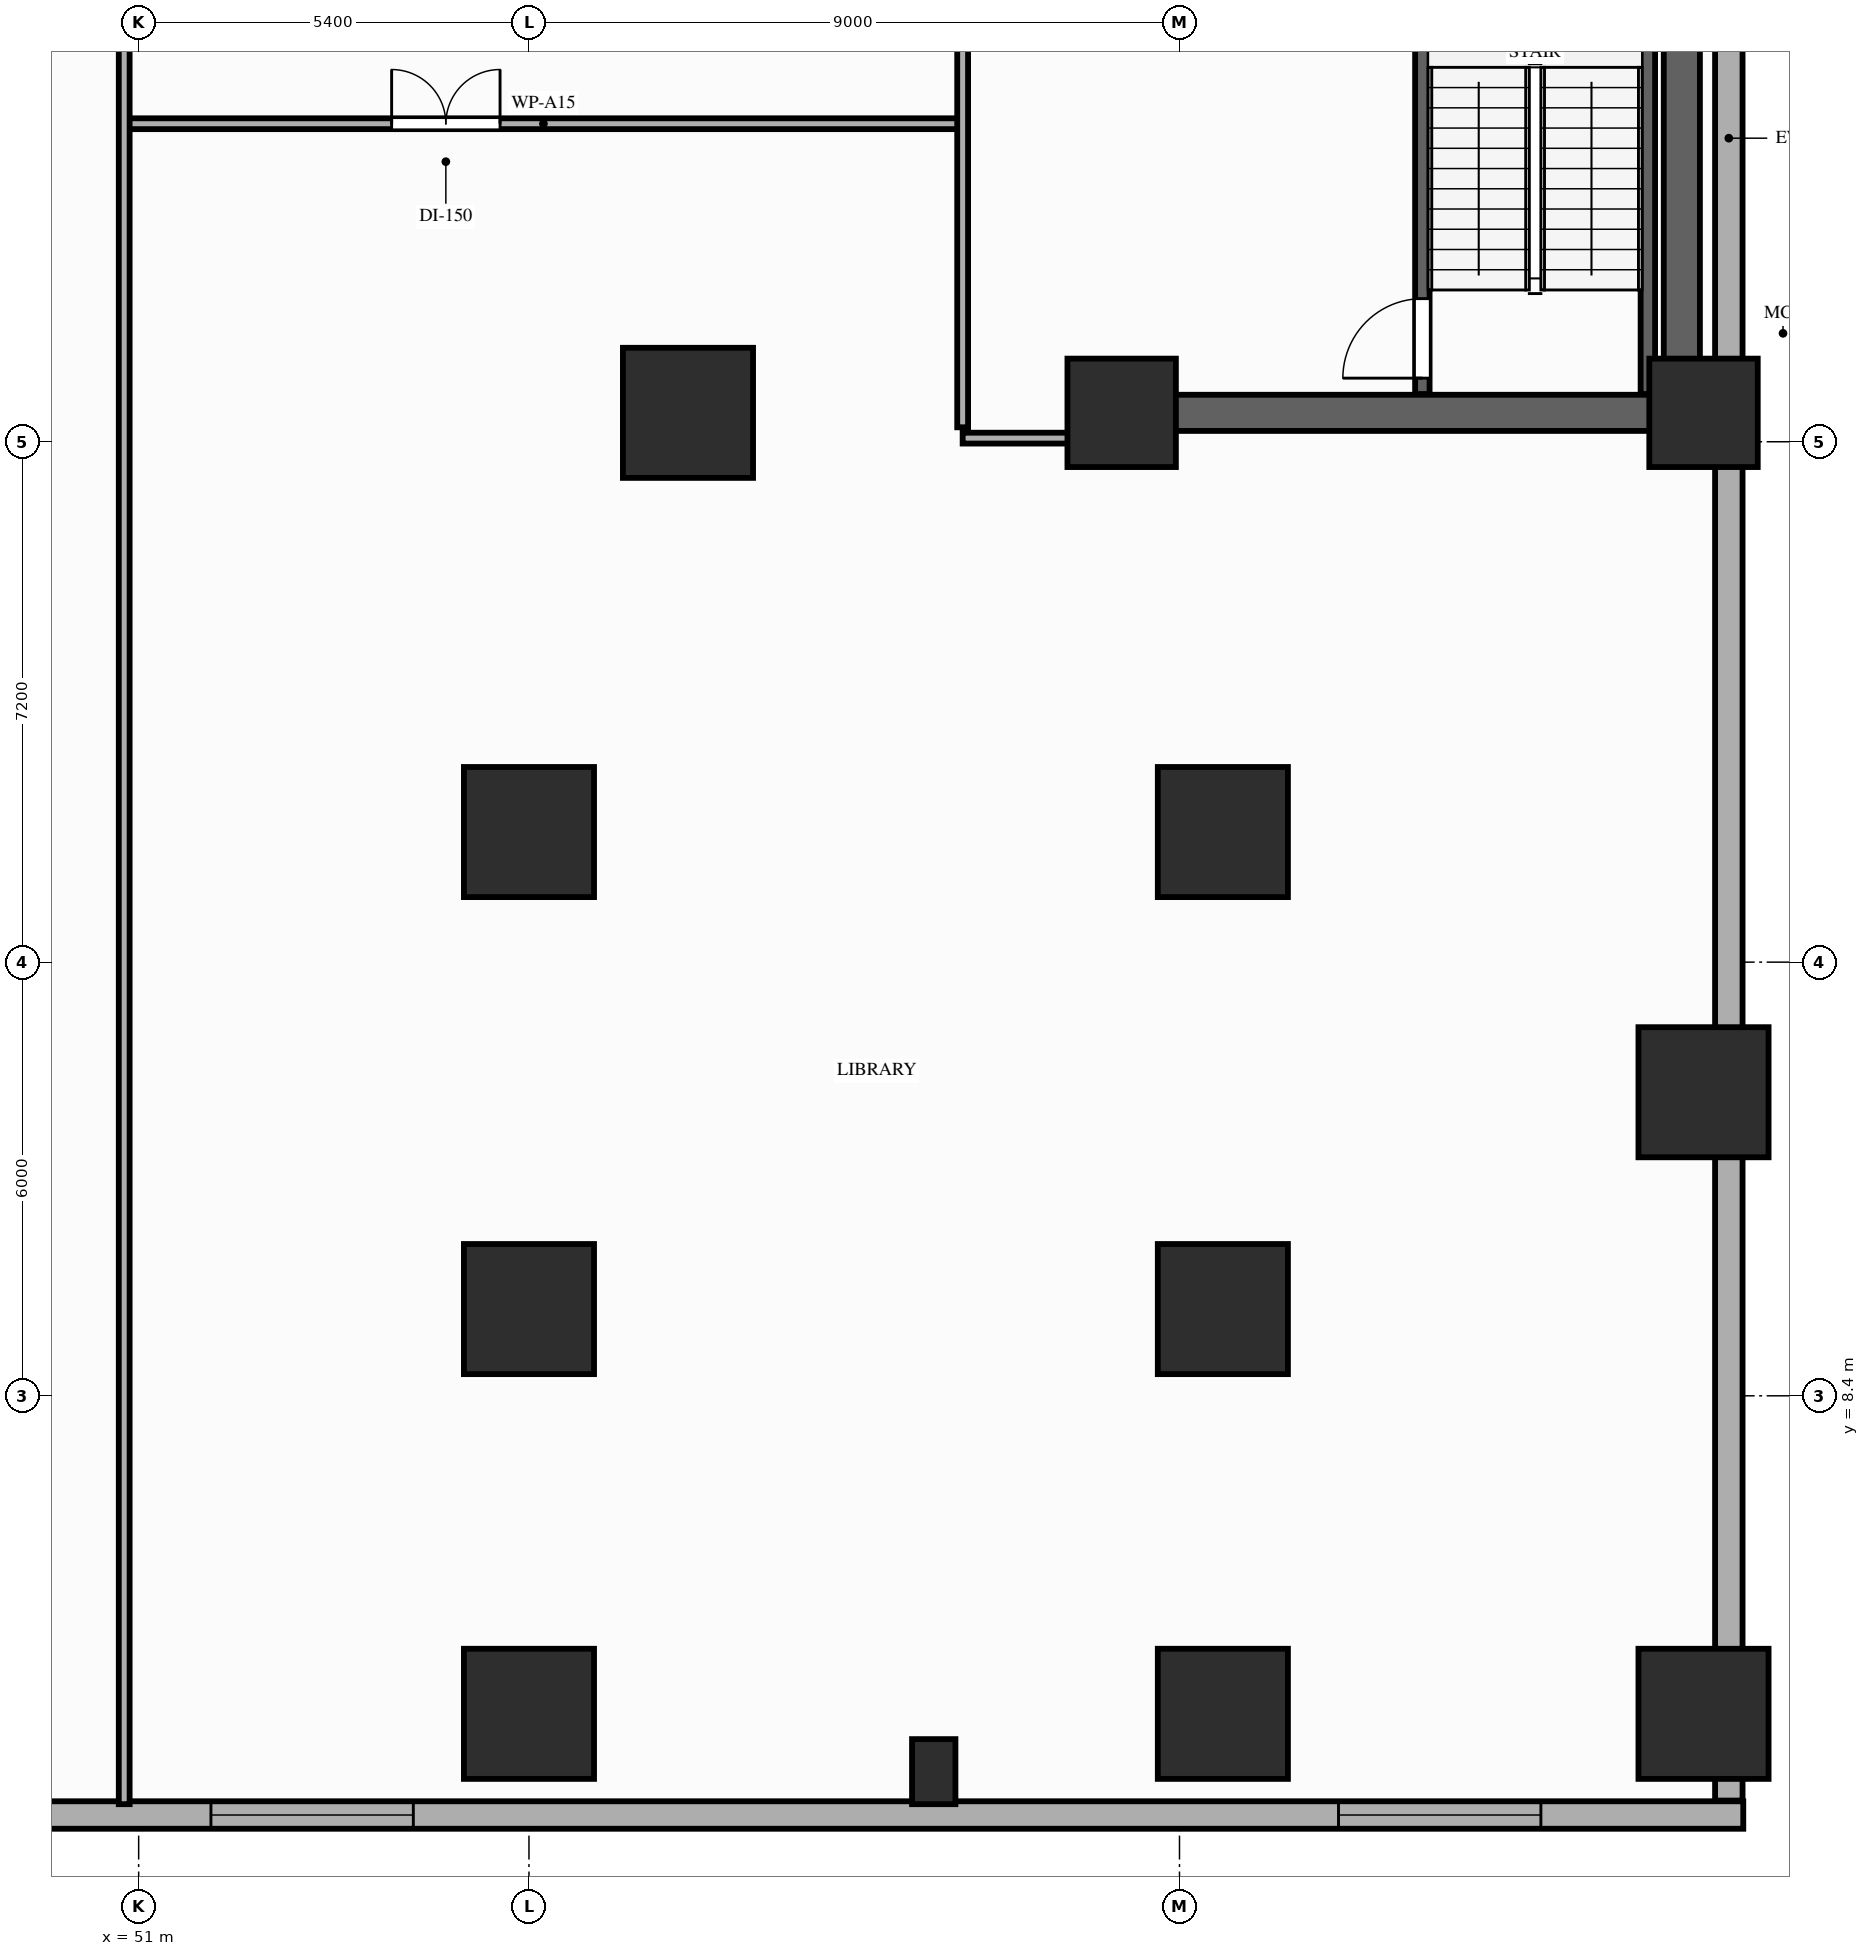
"""IFC4 building model, lengths in metres.
Left out: names, types, materials, properties, quantities, classifications, styles, units other than length and angle.
Written with IfcOpenShell. Run it as: python <this file> out.ifc"""

import sys

from ifc_helpers import new_model, si_unit, direction, frame, frame_2d, origin, origin_2d, place, context, subcontext, project, spatial, rectangle, extrude, element, fill, save


model = new_model("IFC4")
c1 = context("Model", 3, precision=1e-05, world=origin(), true_north=direction((0.0, 1.0)))
c2 = subcontext(c1, "Body", "Model", "MODEL_VIEW")
j1 = project(units=[si_unit("LENGTHUNIT", "METRE"), si_unit("PLANEANGLEUNIT", "RADIAN")], contexts=[c1])
p1 = place(None, origin())
s1 = spatial("IfcSite", under=j1, at=p1, CompositionType="ELEMENT")
p2 = place(p1, origin())
s2 = spatial("IfcBuilding", under=s1, at=p2, CompositionType="ELEMENT")
p3 = place(p2, frame((0.0, 0.0, 4.6)))
s3 = spatial("IfcBuildingStorey", under=s2, at=p3, CompositionType="ELEMENT", Elevation=4.6)
for number, where, z_axis, x_axis in (
    (1, (64.6, 22.0, 0.0), (0.0, 0.0, 1.0), (1.0, 0.0, 0.0)),
    (2, (72.65, 22.0, 0.0), (0.0, 0.0, 1.0), (1.0, 0.0, 0.0)),
):
    element("IfcColumn", number, at=place(p3, frame(where, z_axis=z_axis, x_axis=x_axis)), inside=s3, PredefinedType="COLUMN", context=c2, shape_type="SweptSolid", body=[
        extrude(rectangle(XDim=1.5, YDim=1.5, at=origin_2d()), origin(), (0.0, 0.0, 1.0), 4.2),
    ])
for number, where, z_axis, x_axis in (
    (3, (58.6, 22.0, 0.0), (0.0, 0.0, 1.0), (1.0, 0.0, 0.0)),
    (4, (56.4, 9.6, 0.0), (0.0, 0.0, 1.0), (1.0, 0.0, 0.0)),
    (5, (66.0, 9.6, 0.0), (0.0, 0.0, 1.0), (1.0, 0.0, 0.0)),
    (6, (56.4, 16.2, 0.0), (0.0, 0.0, 1.0), (1.0, 0.0, 0.0)),
    (7, (66.0, 16.2, 0.0), (0.0, 0.0, 1.0), (1.0, 0.0, 0.0)),
    (8, (56.4, 4.0, 0.0), (0.0, 0.0, 1.0), (1.0, 0.0, 0.0)),
    (9, (66.0, 4.0, 0.0), (0.0, 0.0, 1.0), (1.0, 0.0, 0.0)),
    (10, (72.65, 4.0, 0.0), (0.0, 0.0, 1.0), (1.0, 0.0, 0.0)),
    (11, (72.65, 12.6, 0.0), (0.0, 0.0, 1.0), (1.0, 0.0, 0.0)),
):
    element("IfcColumn", number, at=place(p3, frame(where, z_axis=z_axis, x_axis=x_axis)), inside=s3, PredefinedType="COLUMN", context=c2, shape_type="SweptSolid", body=[
        extrude(rectangle(XDim=1.8, YDim=1.8, at=origin_2d()), origin(), (0.0, 0.0, 1.0), 4.2),
    ])
p4 = place(p3, frame((62.0, 3.2, 0.0), z_axis=(0.0, 0.0, 1.0), x_axis=(1.0, 0.0, 0.0)))
e12 = element("IfcColumn", 12, at=p4, inside=s3, PredefinedType="PILASTER", context=c2, shape_type="SweptSolid", body=[
    extrude(rectangle(XDim=0.6, YDim=0.9, at=origin_2d()), origin(), (0.0, 0.0, 1.0), 4.2),
])
p5 = place(p3, frame((3.6, 2.6, 0.0), z_axis=(0.0, 0.0, 1.0), x_axis=(1.0, 0.0, 0.0)))
e13 = element("IfcWall", 13, at=p5, inside=s3, PredefinedType="STANDARD", context=c2, shape_type="SweptSolid", body=[
    extrude(rectangle(XDim=69.6, YDim=0.38, at=frame_2d((34.8, 0.0))), origin(), (0.0, 0.0, 1.0), 3.95),
])
p6 = place(p5, frame((17.2, 0.0, 0.9)))
e14 = element("IfcOpeningElement", 14, at=p6, cuts=e13, PredefinedType="OPENING", context=c2, shape_type="SweptSolid", body=[
    extrude(rectangle(XDim=2.8, YDim=2.2, at=frame_2d((1.4, 1.1))), frame((0.0, 0.2, 0.0), z_axis=(0.0, -1.0, 0.0), x_axis=(1.0, 0.0, 0.0)), (0.0, 0.0, 1.0), 0.4),
])
p7 = place(p5, frame((24.6, 0.0, 0.9)))
e15 = element("IfcOpeningElement", 15, at=p7, cuts=e13, PredefinedType="OPENING", context=c2, shape_type="SweptSolid", body=[
    extrude(rectangle(XDim=2.8, YDim=2.2, at=frame_2d((1.4, 1.1))), frame((0.0, 0.2, 0.0), z_axis=(0.0, -1.0, 0.0), x_axis=(1.0, 0.0, 0.0)), (0.0, 0.0, 1.0), 0.4),
])
p8 = place(p5, frame((36.2, 0.0, 0.9)))
e16 = element("IfcOpeningElement", 16, at=p8, cuts=e13, PredefinedType="OPENING", context=c2, shape_type="SweptSolid", body=[
    extrude(rectangle(XDim=2.8, YDim=2.2, at=frame_2d((1.4, 1.1))), frame((0.0, 0.2, 0.0), z_axis=(0.0, -1.0, 0.0), x_axis=(1.0, 0.0, 0.0)), (0.0, 0.0, 1.0), 0.4),
])
p9 = place(p5, frame((48.4, 0.0, 0.9)))
e17 = element("IfcOpeningElement", 17, at=p9, cuts=e13, PredefinedType="OPENING", context=c2, shape_type="SweptSolid", body=[
    extrude(rectangle(XDim=2.8, YDim=2.2, at=frame_2d((1.4, 1.1))), frame((0.0, 0.2, 0.0), z_axis=(0.0, -1.0, 0.0), x_axis=(1.0, 0.0, 0.0)), (0.0, 0.0, 1.0), 0.4),
])
p10 = place(p5, frame((64.0, 0.0, 0.9)))
e18 = element("IfcOpeningElement", 18, at=p10, cuts=e13, PredefinedType="OPENING", context=c2, shape_type="SweptSolid", body=[
    extrude(rectangle(XDim=2.8, YDim=2.2, at=frame_2d((1.4, 1.1))), frame((0.0, 0.2, 0.0), z_axis=(0.0, -1.0, 0.0), x_axis=(1.0, 0.0, 0.0)), (0.0, 0.0, 1.0), 0.4),
])
p11 = place(p3, frame((73.0, 2.8, 0.0), z_axis=(0.0, 0.0, 1.0), x_axis=(0.0, 1.0, 0.0)))
e19 = element("IfcWall", 19, at=p11, inside=s3, PredefinedType="STANDARD", context=c2, shape_type="SweptSolid", body=[
    extrude(rectangle(XDim=46.0, YDim=0.38, at=frame_2d((23.0, 0.0))), origin(), (0.0, 0.0, 1.0), 3.23),
])
p12 = place(p3, frame((72.35, 22.0, 0.0), z_axis=(0.0, 0.0, 1.0), x_axis=(0.0, 1.0, 0.0)))
e20 = element("IfcWall", 20, at=p12, inside=s3, PredefinedType="SHEAR", context=c2, shape_type="SweptSolid", body=[
    extrude(rectangle(XDim=20.25, YDim=0.5, at=frame_2d((10.125, 0.0))), origin(), (0.0, 0.0, 1.0), 3.95),
])
p13 = place(p3, frame((64.6, 22.0, 0.0), z_axis=(0.0, 0.0, 1.0), x_axis=(1.0, 0.0, 0.0)))
e21 = element("IfcWall", 21, at=p13, inside=s3, PredefinedType="SHEAR", context=c2, shape_type="SweptSolid", body=[
    extrude(rectangle(XDim=7.5, YDim=0.5, at=frame_2d((3.75, 0.0))), origin(), (0.0, 0.0, 1.0), 3.95),
])
p14 = place(p3, frame((68.76, 22.26, 0.0), z_axis=(0.0, 0.0, 1.0), x_axis=(0.0, 1.0, 0.0)))
e22 = element("IfcWall", 22, at=p14, inside=s3, PredefinedType="SHEAR", context=c2, shape_type="SweptSolid", body=[
    extrude(rectangle(XDim=7.82, YDim=0.2, at=frame_2d((3.91, 0.0))), origin(), (0.0, 0.0, 1.0), 3.95),
])
p15 = place(p14, frame((0.22, 0.0, 0.0)))
e23 = element("IfcOpeningElement", 23, at=p15, cuts=e22, PredefinedType="OPENING", context=c2, shape_type="SweptSolid", body=[
    extrude(rectangle(XDim=1.1, YDim=2.15, at=frame_2d((0.55, 1.075))), frame((0.0, 0.11, 0.0), z_axis=(0.0, -1.0, 0.0), x_axis=(1.0, 0.0, 0.0)), (0.0, 0.0, 1.0), 0.22),
])
p16 = place(p3, frame((71.88, 22.26, 0.0), z_axis=(0.0, 0.0, 1.0), x_axis=(0.0, 1.0, 0.0)))
e24 = element("IfcWall", 24, at=p16, inside=s3, PredefinedType="SHEAR", context=c2, shape_type="SweptSolid", body=[
    extrude(rectangle(XDim=7.82, YDim=0.2, at=frame_2d((3.91, 0.0))), origin(), (0.0, 0.0, 1.0), 3.95),
])
p17 = place(p3, frame((50.8, 26.0, 0.0), z_axis=(0.0, 0.0, 1.0), x_axis=(1.0, 0.0, 0.0)))
e25 = element("IfcWall", 25, at=p17, inside=s3, PredefinedType="PARTITIONING", context=c2, shape_type="SweptSolid", body=[
    extrude(rectangle(XDim=11.6, YDim=0.15, at=frame_2d((5.8, 0.0))), origin(), (0.0, 0.0, 1.0), 3.23),
])
p18 = place(p17, frame((3.7, 0.0, 0.0)))
e26 = element("IfcOpeningElement", 26, at=p18, cuts=e25, PredefinedType="OPENING", context=c2, shape_type="SweptSolid", body=[
    extrude(rectangle(XDim=1.5, YDim=2.18, at=frame_2d((0.75, 1.09))), frame((0.0, 0.085, 0.0), z_axis=(0.0, -1.0, 0.0), x_axis=(1.0, 0.0, 0.0)), (0.0, 0.0, 1.0), 0.17),
])
p19 = place(p3, frame((50.8, 2.75, 0.0), z_axis=(0.0, 0.0, 1.0), x_axis=(0.0, 1.0, 0.0)))
e27 = element("IfcWall", 27, at=p19, inside=s3, PredefinedType="PARTITIONING", context=c2, shape_type="SweptSolid", body=[
    extrude(rectangle(XDim=24.85, YDim=0.15, at=frame_2d((12.425, 0.0))), origin(), (0.0, 0.0, 1.0), 3.03),
])
p20 = place(p3, frame((62.4, 21.8, 0.0), z_axis=(0.0, 0.0, 1.0), x_axis=(0.0, 1.0, 0.0)))
e28 = element("IfcWall", 28, at=p20, inside=s3, PredefinedType="PARTITIONING", context=c2, shape_type="SweptSolid", body=[
    extrude(rectangle(XDim=27.05, YDim=0.15, at=frame_2d((13.525, 0.0))), origin(), (0.0, 0.0, 1.0), 3.23),
])
p21 = place(p20, frame((6.2, 0.0, 0.0)))
e29 = element("IfcOpeningElement", 29, at=p21, cuts=e28, PredefinedType="OPENING", context=c2, shape_type="SweptSolid", body=[
    extrude(rectangle(XDim=1.1, YDim=2.15, at=frame_2d((0.55, 1.075))), frame((0.0, 0.085, 0.0), z_axis=(0.0, -1.0, 0.0), x_axis=(1.0, 0.0, 0.0)), (0.0, 0.0, 1.0), 0.17),
])
p22 = place(p3, frame((62.4, 21.65, 0.0), z_axis=(0.0, 0.0, 1.0), x_axis=(1.0, 0.0, 0.0)))
e30 = element("IfcWall", 30, at=p22, inside=s3, PredefinedType="PARTITIONING", context=c2, shape_type="SweptSolid", body=[
    extrude(rectangle(XDim=2.05, YDim=0.15, at=frame_2d((1.025, 0.0))), origin(), (0.0, 0.0, 1.0), 3.23),
])
p23 = place(p9, origin())
e31 = element("IfcWindow", 31, at=p23, inside=s3, PartitioningType="SINGLE_PANEL", PredefinedType="WINDOW", context=c2, shape_type="SweptSolid", body=[
    extrude(rectangle(XDim=2.8, YDim=2.2, at=frame_2d((1.4, 1.1))), frame((0.0, 0.03, 0.0), z_axis=(0.0, -1.0, 0.0), x_axis=(1.0, 0.0, 0.0)), (0.0, 0.0, 1.0), 0.06),
])
fill(e17, e31)
p24 = place(p10, origin())
e32 = element("IfcWindow", 32, at=p24, inside=s3, PartitioningType="SINGLE_PANEL", PredefinedType="WINDOW", context=c2, shape_type="SweptSolid", body=[
    extrude(rectangle(XDim=2.8, YDim=2.2, at=frame_2d((1.4, 1.1))), frame((0.0, 0.03, 0.0), z_axis=(0.0, -1.0, 0.0), x_axis=(1.0, 0.0, 0.0)), (0.0, 0.0, 1.0), 0.06),
])
fill(e18, e32)
p25 = place(p15, origin())
e33 = element("IfcDoor", 33, at=p25, inside=s3, OperationType="SINGLE_SWING_LEFT", PredefinedType="DOOR", context=c2, shape_type="SweptSolid", body=[
    extrude(rectangle(XDim=1.1, YDim=2.15, at=frame_2d((0.55, 1.075))), frame((0.0, 0.025, 0.0), z_axis=(0.0, -1.0, 0.0), x_axis=(1.0, 0.0, 0.0)), (0.0, 0.0, 1.0), 0.05),
])
fill(e23, e33)
p26 = place(p18, origin())
e34 = element("IfcDoor", 34, at=p26, inside=s3, OperationType="DOUBLE_DOOR_SINGLE_SWING", PredefinedType="DOOR", context=c2, shape_type="SweptSolid", body=[
    extrude(rectangle(XDim=1.5, YDim=2.18, at=frame_2d((0.75, 1.09))), frame((0.0, 0.025, 0.0), z_axis=(0.0, -1.0, 0.0), x_axis=(1.0, 0.0, 0.0)), (0.0, 0.0, 1.0), 0.05),
])
fill(e26, e34)
save(model, sys.argv[1])
